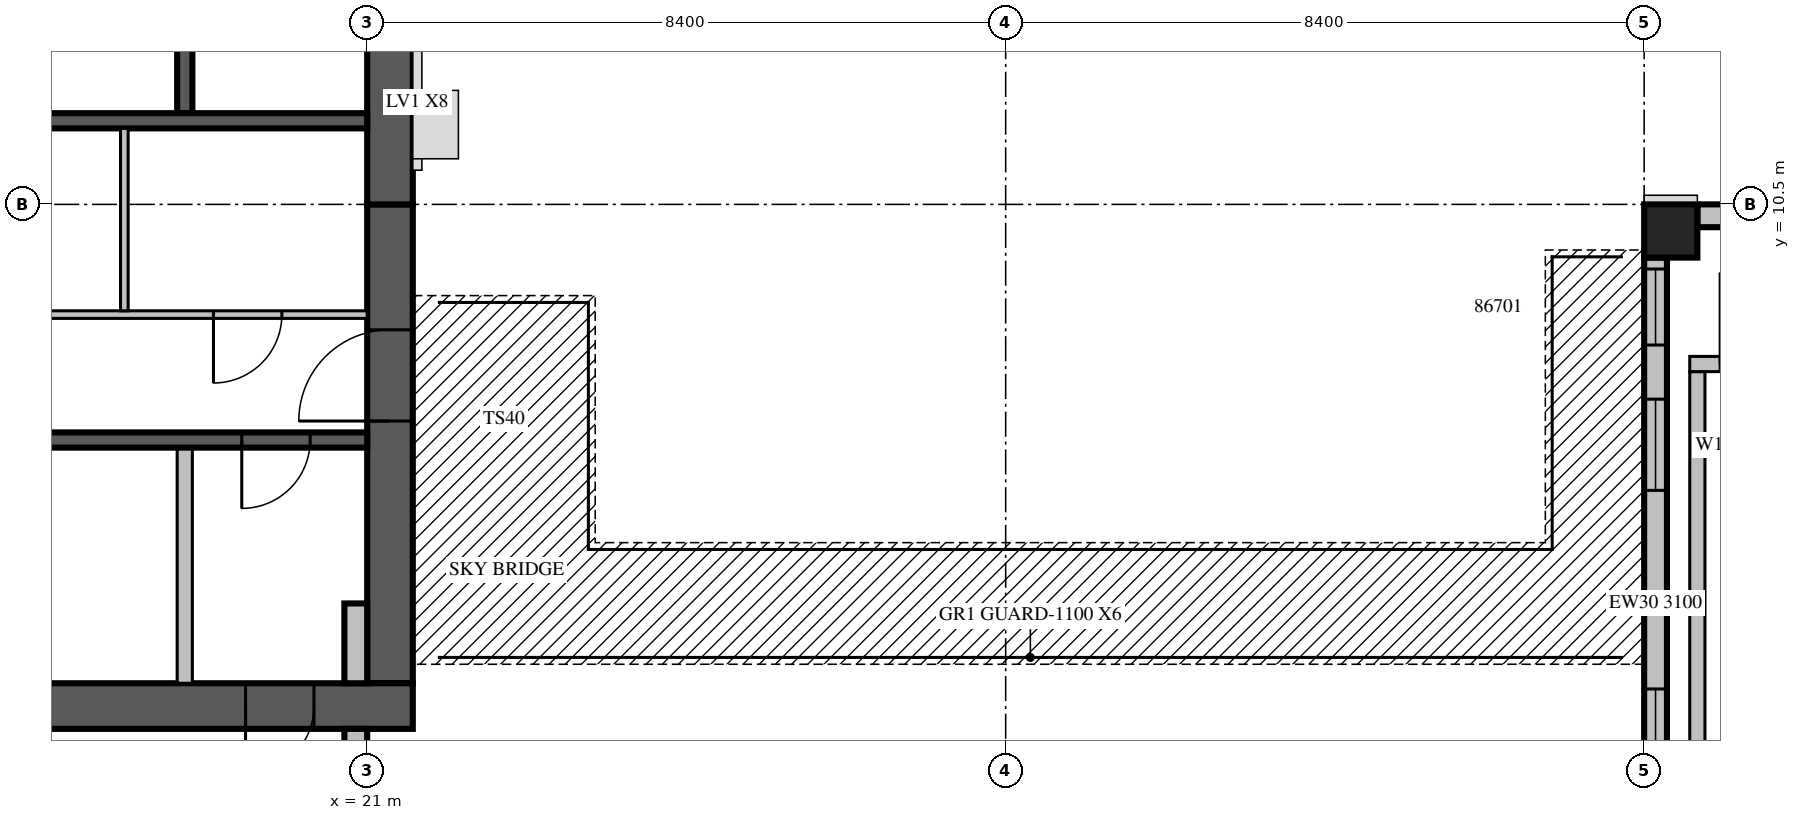
"""IFC4 building model, lengths in metres.
Left out: names, types, materials, properties, quantities, classifications, styles, units other than length and angle.
Written with IfcOpenShell. Run it as: python <this file> out.ifc"""

import sys

from ifc_helpers import new_model, si_unit, direction, frame, frame_2d, origin, origin_2d, place, context, subcontext, project, spatial, rectangle, extrude, source, transform, mapped, element, fill, save


model = new_model("IFC4")
c1 = context("Model", 3, precision=1e-05, world=origin(), true_north=direction((0.0, 1.0)))
c2 = subcontext(c1, "Body", "Model", "MODEL_VIEW")
j1 = project(units=[si_unit("LENGTHUNIT", "METRE"), si_unit("PLANEANGLEUNIT", "RADIAN")], contexts=[c1])
p1 = place(None, origin())
s1 = spatial("IfcSite", under=j1, at=p1, CompositionType="ELEMENT")
p2 = place(p1, origin())
s2 = spatial("IfcBuilding", under=s1, at=p2, CompositionType="ELEMENT")
p3 = place(p2, frame((0.0, 0.0, 295.0)))
s3 = spatial("IfcBuildingStorey", under=s2, at=p3, CompositionType="ELEMENT", Elevation=295.0)
m1 = source(origin(), c2, "Body", "SweptSolid", [
    extrude(rectangle(XDim=0.7, YDim=0.7, at=origin_2d()), origin(), (0.0, 0.0, 1.0), 3.5),
])
p4 = place(p3, frame((38.15, 10.15, 0.0), z_axis=(0.0, 0.0, 1.0), x_axis=(1.0, 0.0, 0.0)))
e1 = element("IfcColumn", 1, at=p4, inside=s3, PredefinedType="COLUMN", context=c2, shape_type="MappedRepresentation", body=[
    mapped(m1, transform((0.0, 0.0, 0.0), scale=1.0)),
])
m2 = source(origin(), c2, "Body", "SweptSolid", [
    extrude(rectangle(XDim=6.3, YDim=0.6, at=frame_2d((3.15, 0.0))), origin(), (0.0, 0.0, 1.0), 3.5),
])
p5 = place(p3, frame((21.3, 4.2, 0.0), z_axis=(0.0, 0.0, 1.0), x_axis=(0.0, 1.0, 0.0)))
e2 = element("IfcWall", 2, at=p5, inside=s3, PredefinedType="SHEAR", context=c2, shape_type="MappedRepresentation", body=[
    mapped(m2, transform((0.0, 0.0, 0.0), scale=1.0)),
])
m3 = source(origin(), c2, "Body", "SweptSolid", [
    extrude(rectangle(XDim=1.2, YDim=2.1, at=frame_2d((0.6, 1.05))), frame((0.0, 0.31, 0.0), z_axis=(0.0, -1.0, 0.0), x_axis=(1.0, 0.0, 0.0)), (0.0, 0.0, 1.0), 0.62),
])
p6 = place(p5, frame((3.45, 0.0, 0.0)))
e3 = element("IfcOpeningElement", 3, at=p6, cuts=e2, PredefinedType="OPENING", context=c2, shape_type="MappedRepresentation", body=[
    mapped(m3, transform((0.0, 0.0, 0.0), scale=1.0)),
])
m4 = source(origin(), c2, "Body", "SweptSolid", [
    extrude(rectangle(XDim=17.4, YDim=0.6, at=frame_2d((8.7, 0.0))), origin(), (0.0, 0.0, 1.0), 3.5),
])
p7 = place(p3, frame((4.2, 3.9, 0.0), z_axis=(0.0, 0.0, 1.0), x_axis=(1.0, 0.0, 0.0)))
e4 = element("IfcWall", 4, at=p7, inside=s3, PredefinedType="SHEAR", context=c2, shape_type="MappedRepresentation", body=[
    mapped(m4, transform((0.0, 0.0, 0.0), scale=1.0)),
])
m5 = source(origin(), c2, "Body", "SweptSolid", [
    extrude(rectangle(XDim=0.9, YDim=2.1, at=frame_2d((0.45, 1.05))), frame((0.0, 0.31, 0.0), z_axis=(0.0, -1.0, 0.0), x_axis=(1.0, 0.0, 0.0)), (0.0, 0.0, 1.0), 0.62),
])
p8 = place(p7, frame((15.2, 0.0, 0.0)))
e5 = element("IfcOpeningElement", 5, at=p8, cuts=e4, PredefinedType="OPENING", context=c2, shape_type="MappedRepresentation", body=[
    mapped(m5, transform((0.0, 0.0, 0.0), scale=1.0)),
])
m6 = source(origin(), c2, "Body", "SweptSolid", [
    extrude(rectangle(XDim=10.5, YDim=0.6, at=frame_2d((5.25, 0.0))), origin(), (0.0, 0.0, 1.0), 3.5),
])
p9 = place(p3, frame((21.3, 10.5, 0.0), z_axis=(0.0, 0.0, 1.0), x_axis=(0.0, 1.0, 0.0)))
e6 = element("IfcWall", 6, at=p9, inside=s3, PredefinedType="SHEAR", context=c2, shape_type="MappedRepresentation", body=[
    mapped(m6, transform((0.0, 0.0, 0.0), scale=1.0)),
])
m7 = source(origin(), c2, "Body", "SweptSolid", [
    extrude(rectangle(XDim=1.2, YDim=2.4, at=frame_2d((0.6, 1.2))), frame((0.0, 0.31, 0.0), z_axis=(0.0, -1.0, 0.0), x_axis=(1.0, 0.0, 0.0)), (0.0, 0.0, 1.0), 0.62),
])
p10 = place(p9, frame((5.7, 0.0, 0.6)))
e7 = element("IfcOpeningElement", 7, at=p10, cuts=e6, PredefinedType="OPENING", context=c2, shape_type="MappedRepresentation", body=[
    mapped(m7, transform((0.0, 0.0, 0.0), scale=1.0)),
])
m8 = source(origin(), c2, "Body", "SweptSolid", [
    extrude(rectangle(XDim=2.9, YDim=0.3, at=frame_2d((1.45, 0.0))), origin(), (0.0, 0.0, 1.0), 3.1),
])
p11 = place(p3, frame((20.85, 0.7, 0.0), z_axis=(0.0, 0.0, 1.0), x_axis=(0.0, 1.0, 0.0)))
e8 = element("IfcWall", 8, at=p11, inside=s3, PredefinedType="STANDARD", context=c2, shape_type="MappedRepresentation", body=[
    mapped(m8, transform((0.0, 0.0, 0.0), scale=1.0)),
])
m9 = source(origin(), c2, "Body", "SweptSolid", [
    extrude(rectangle(XDim=1.2, YDim=2.0, at=frame_2d((0.6, 1.0))), frame((0.0, 0.16, 0.0), z_axis=(0.0, -1.0, 0.0), x_axis=(1.0, 0.0, 0.0)), (0.0, 0.0, 1.0), 0.32),
])
p12 = place(p11, frame((1.325, 0.0, 0.6)))
e9 = element("IfcOpeningElement", 9, at=p12, cuts=e8, PredefinedType="OPENING", context=c2, shape_type="MappedRepresentation", body=[
    mapped(m9, transform((0.0, 0.0, 0.0), scale=1.0)),
])
m10 = source(origin(), c2, "Body", "SweptSolid", [
    extrude(rectangle(XDim=1.05, YDim=0.3, at=frame_2d((0.525, 0.0))), origin(), (0.0, 0.0, 1.0), 3.1),
])
p13 = place(p3, frame((20.85, 4.2, 0.0), z_axis=(0.0, 0.0, 1.0), x_axis=(0.0, 1.0, 0.0)))
e10 = element("IfcWall", 10, at=p13, inside=s3, PredefinedType="STANDARD", context=c2, shape_type="MappedRepresentation", body=[
    mapped(m10, transform((0.0, 0.0, 0.0), scale=1.0)),
])
m11 = source(origin(), c2, "Body", "SweptSolid", [
    extrude(rectangle(XDim=7.35, YDim=0.3, at=frame_2d((3.675, 0.0))), origin(), (0.0, 0.0, 1.0), 3.1),
])
p14 = place(p3, frame((45.85, 10.35, 0.0), z_axis=(0.0, 0.0, 1.0), x_axis=(-1.0, 0.0, 0.0)))
e11 = element("IfcWall", 11, at=p14, inside=s3, PredefinedType="STANDARD", context=c2, shape_type="MappedRepresentation", body=[
    mapped(m11, transform((0.0, 0.0, 0.0), scale=1.0)),
])
m12 = source(origin(), c2, "Body", "SweptSolid", [
    extrude(rectangle(XDim=3.0, YDim=2.0, at=frame_2d((1.5, 1.0))), frame((0.0, 0.16, 0.0), z_axis=(0.0, -1.0, 0.0), x_axis=(1.0, 0.0, 0.0)), (0.0, 0.0, 1.0), 0.32),
])
p15 = place(p14, frame((1.09, 0.0, 0.6)))
e12 = element("IfcOpeningElement", 12, at=p15, cuts=e11, PredefinedType="OPENING", context=c2, shape_type="MappedRepresentation", body=[
    mapped(m12, transform((0.0, 0.0, 0.0), scale=1.0)),
])
p16 = place(p14, frame((5.77, 0.0, 0.6)))
e13 = element("IfcOpeningElement", 13, at=p16, cuts=e11, PredefinedType="OPENING", context=c2, shape_type="MappedRepresentation", body=[
    mapped(m9, transform((0.0, 0.0, 0.0), scale=1.0)),
])
p17 = place(p3, frame((37.95, 9.8, 0.0), z_axis=(0.0, 0.0, 1.0), x_axis=(0.0, -1.0, 0.0)))
e14 = element("IfcWall", 14, at=p17, inside=s3, PredefinedType="STANDARD", context=c2, shape_type="SweptSolid", body=[
    extrude(rectangle(XDim=9.1, YDim=0.3, at=frame_2d((4.55, 0.0))), origin(), (0.0, 0.0, 1.0), 3.1),
])
p18 = place(p17, frame((1.863, 0.0, 0.6)))
e15 = element("IfcOpeningElement", 15, at=p18, cuts=e14, PredefinedType="OPENING", context=c2, shape_type="MappedRepresentation", body=[
    mapped(m9, transform((0.0, 0.0, 0.0), scale=1.0)),
])
p19 = place(p17, frame((5.675, 0.0, 0.6)))
e16 = element("IfcOpeningElement", 16, at=p19, cuts=e14, PredefinedType="OPENING", context=c2, shape_type="MappedRepresentation", body=[
    mapped(m12, transform((0.0, 0.0, 0.0), scale=1.0)),
])
p20 = place(p17, frame((0.15, 0.0, 0.0)))
e17 = element("IfcOpeningElement", 17, at=p20, cuts=e14, PredefinedType="OPENING", context=c2, shape_type="SweptSolid", body=[
    extrude(rectangle(XDim=1.0, YDim=2.1, at=frame_2d((0.5, 1.05))), frame((0.0, 0.16, 0.0), z_axis=(0.0, -1.0, 0.0), x_axis=(1.0, 0.0, 0.0)), (0.0, 0.0, 1.0), 0.32),
])
m13 = source(origin(), c2, "Body", "SweptSolid", [
    extrude(rectangle(XDim=3.1, YDim=0.2, at=frame_2d((1.55, 0.0))), origin(), (0.0, 0.0, 1.0), 3.1),
])
p21 = place(p3, frame((18.6, 4.2, 0.0), z_axis=(0.0, 0.0, 1.0), x_axis=(0.0, 1.0, 0.0)))
e18 = element("IfcWall", 18, at=p21, inside=s3, PredefinedType="PARTITIONING", context=c2, shape_type="MappedRepresentation", body=[
    mapped(m13, transform((0.0, 0.0, 0.0), scale=1.0)),
])
m14 = source(origin(), c2, "Body", "SweptSolid", [
    extrude(rectangle(XDim=3.0, YDim=0.2, at=frame_2d((1.5, 0.0))), origin(), (0.0, 0.0, 1.0), 3.5),
])
p22 = place(p3, frame((18.6, 11.7, 0.0), z_axis=(0.0, 0.0, 1.0), x_axis=(0.0, 1.0, 0.0)))
e19 = element("IfcWall", 19, at=p22, inside=s3, PredefinedType="SOLIDWALL", context=c2, shape_type="MappedRepresentation", body=[
    mapped(m14, transform((0.0, 0.0, 0.0), scale=1.0)),
])
m15 = source(origin(), c2, "Body", "SweptSolid", [
    extrude(rectangle(XDim=7.2, YDim=0.2, at=frame_2d((3.6, 0.0))), origin(), (0.0, 0.0, 1.0), 3.1),
])
p23 = place(p3, frame((13.8, 7.4, 0.0), z_axis=(0.0, 0.0, 1.0), x_axis=(1.0, 0.0, 0.0)))
e20 = element("IfcWall", 20, at=p23, inside=s3, PredefinedType="SOLIDWALL", context=c2, shape_type="MappedRepresentation", body=[
    mapped(m15, transform((0.0, 0.0, 0.0), scale=1.0)),
])
m16 = source(origin(), c2, "Body", "SweptSolid", [
    extrude(rectangle(XDim=0.9, YDim=2.1, at=frame_2d((0.45, 1.05))), frame((0.0, 0.11, 0.0), z_axis=(0.0, -1.0, 0.0), x_axis=(1.0, 0.0, 0.0)), (0.0, 0.0, 1.0), 0.22),
])
p24 = place(p23, frame((1.95, 0.0, 0.0)))
e21 = element("IfcOpeningElement", 21, at=p24, cuts=e20, PredefinedType="OPENING", context=c2, shape_type="MappedRepresentation", body=[
    mapped(m16, transform((0.0, 0.0, 0.0), scale=1.0)),
])
p25 = place(p23, frame((5.55, 0.0, 0.0)))
e22 = element("IfcOpeningElement", 22, at=p25, cuts=e20, PredefinedType="OPENING", context=c2, shape_type="MappedRepresentation", body=[
    mapped(m16, transform((0.0, 0.0, 0.0), scale=1.0)),
])
m17 = source(origin(), c2, "Body", "SweptSolid", [
    extrude(rectangle(XDim=7.2, YDim=0.2, at=frame_2d((3.6, 0.0))), origin(), (0.0, 0.0, 1.0), 3.5),
])
p26 = place(p3, frame((13.8, 11.6, 0.0), z_axis=(0.0, 0.0, 1.0), x_axis=(1.0, 0.0, 0.0)))
e23 = element("IfcWall", 23, at=p26, inside=s3, PredefinedType="SOLIDWALL", context=c2, shape_type="MappedRepresentation", body=[
    mapped(m17, transform((0.0, 0.0, 0.0), scale=1.0)),
])
p27 = place(p3, frame((13.8, 9.05, 0.0), z_axis=(0.0, 0.0, 1.0), x_axis=(1.0, 0.0, 0.0)))
e24 = element("IfcWall", 24, at=p27, inside=s3, PredefinedType="PARTITIONING", context=c2, shape_type="SweptSolid", body=[
    extrude(rectangle(XDim=7.2, YDim=0.1, at=frame_2d((3.6, 0.0))), origin(), (0.0, 0.0, 1.0), 3.1),
])
m18 = source(origin(), c2, "Body", "SweptSolid", [
    extrude(rectangle(XDim=0.9, YDim=2.1, at=frame_2d((0.45, 1.05))), frame((0.0, 0.06, 0.0), z_axis=(0.0, -1.0, 0.0), x_axis=(1.0, 0.0, 0.0)), (0.0, 0.0, 1.0), 0.12),
])
p28 = place(p27, frame((5.178, 0.0, 0.0)))
e25 = element("IfcOpeningElement", 25, at=p28, cuts=e24, PredefinedType="OPENING", context=c2, shape_type="MappedRepresentation", body=[
    mapped(m18, transform((0.0, 0.0, 0.0), scale=1.0)),
])
m19 = source(origin(), c2, "Body", "SweptSolid", [
    extrude(rectangle(XDim=2.4, YDim=0.1, at=frame_2d((1.2, 0.0))), origin(), (0.0, 0.0, 1.0), 3.1),
])
p29 = place(p3, frame((17.805, 9.1, 0.0), z_axis=(0.0, 0.0, 1.0), x_axis=(0.0, 1.0, 0.0)))
e26 = element("IfcWall", 26, at=p29, inside=s3, PredefinedType="PARTITIONING", context=c2, shape_type="MappedRepresentation", body=[
    mapped(m19, transform((0.0, 0.0, 0.0), scale=1.0)),
])
m20 = source(origin(), c2, "Body", "SweptSolid", [
    extrude(rectangle(XDim=8.0, YDim=0.2, at=frame_2d((4.0, 0.0))), origin(), (0.0, 0.0, 1.0), 3.1),
])
p30 = place(p3, frame((38.5, 0.3, 0.0), z_axis=(0.0, 0.0, 1.0), x_axis=(0.0, 1.0, 0.0)))
e27 = element("IfcWall", 27, at=p30, inside=s3, PredefinedType="PARTITIONING", context=c2, shape_type="MappedRepresentation", body=[
    mapped(m20, transform((0.0, 0.0, 0.0), scale=1.0)),
])
m21 = source(origin(), c2, "Body", "SweptSolid", [
    extrude(rectangle(XDim=5.45, YDim=0.2, at=frame_2d((2.725, 0.0))), origin(), (0.0, 0.0, 1.0), 3.1),
])
p31 = place(p3, frame((38.4, 8.4, 0.0), z_axis=(0.0, 0.0, 1.0), x_axis=(1.0, 0.0, 0.0)))
e28 = element("IfcWall", 28, at=p31, inside=s3, PredefinedType="PARTITIONING", context=c2, shape_type="MappedRepresentation", body=[
    mapped(m21, transform((0.0, 0.0, 0.0), scale=1.0)),
])
m22 = source(origin(), c2, "Body", "SweptSolid", [
    extrude(rectangle(XDim=1.2, YDim=2.1, at=frame_2d((0.6, 1.05))), frame((0.0, 0.11, 0.0), z_axis=(0.0, -1.0, 0.0), x_axis=(1.0, 0.0, 0.0)), (0.0, 0.0, 1.0), 0.22),
])
p32 = place(p31, frame((0.4, 0.0, 0.0)))
e29 = element("IfcOpeningElement", 29, at=p32, cuts=e28, PredefinedType="OPENING", context=c2, shape_type="MappedRepresentation", body=[
    mapped(m22, transform((0.0, 0.0, 0.0), scale=1.0)),
])
p33 = place(p31, frame((3.25, 0.0, 0.0)))
e30 = element("IfcOpeningElement", 30, at=p33, cuts=e28, PredefinedType="OPENING", context=c2, shape_type="MappedRepresentation", body=[
    mapped(m16, transform((0.0, 0.0, 0.0), scale=1.0)),
])
m23 = source(origin(), c2, "Body", "SweptSolid", [
    extrude(rectangle(XDim=1.2, YDim=2.0, at=frame_2d((0.6, 1.0))), frame((0.0, 0.03, 0.0), z_axis=(0.0, -1.0, 0.0), x_axis=(1.0, 0.0, 0.0)), (0.0, 0.0, 1.0), 0.06),
])
p34 = place(p18, origin())
e31 = element("IfcWindow", 31, at=p34, inside=s3, PartitioningType="SINGLE_PANEL", PredefinedType="WINDOW", context=c2, shape_type="MappedRepresentation", body=[
    mapped(m23, transform((0.0, 0.0, 0.0), scale=1.0)),
])
fill(e15, e31)
m24 = source(origin(), c2, "Body", "SweptSolid", [
    extrude(rectangle(XDim=3.0, YDim=2.0, at=frame_2d((1.5, 1.0))), frame((0.0, 0.03, 0.0), z_axis=(0.0, -1.0, 0.0), x_axis=(1.0, 0.0, 0.0)), (0.0, 0.0, 1.0), 0.06),
])
p35 = place(p19, origin())
e32 = element("IfcWindow", 32, at=p35, inside=s3, PartitioningType="SINGLE_PANEL", PredefinedType="WINDOW", context=c2, shape_type="MappedRepresentation", body=[
    mapped(m24, transform((0.0, 0.0, 0.0), scale=1.0)),
])
fill(e16, e32)
p36 = place(p20, origin())
e33 = element("IfcDoor", 33, at=p36, inside=s3, OperationType="SLIDING_TO_LEFT", PredefinedType="DOOR", context=c2, shape_type="SweptSolid", body=[
    extrude(rectangle(XDim=1.0, YDim=2.1, at=frame_2d((0.5, 1.05))), frame((0.0, 0.025, 0.0), z_axis=(0.0, -1.0, 0.0), x_axis=(1.0, 0.0, 0.0)), (0.0, 0.0, 1.0), 0.05),
])
fill(e17, e33)
m25 = source(origin(), c2, "Body", "SweptSolid", [
    extrude(rectangle(XDim=0.9, YDim=2.1, at=frame_2d((0.45, 1.05))), frame((0.0, 0.025, 0.0), z_axis=(0.0, -1.0, 0.0), x_axis=(1.0, 0.0, 0.0)), (0.0, 0.0, 1.0), 0.05),
])
p37 = place(p25, origin())
e34 = element("IfcDoor", 34, at=p37, inside=s3, OperationType="SINGLE_SWING_RIGHT", PredefinedType="DOOR", context=c2, shape_type="MappedRepresentation", body=[
    mapped(m25, transform((0.0, 0.0, 0.0), scale=1.0)),
])
fill(e22, e34)
p38 = place(p28, origin())
e35 = element("IfcDoor", 35, at=p38, inside=s3, OperationType="SINGLE_SWING_RIGHT", PredefinedType="DOOR", context=c2, shape_type="MappedRepresentation", body=[
    mapped(m25, transform((0.0, 0.0, 0.0), scale=1.0)),
])
fill(e25, e35)
m26 = source(origin(), c2, "Body", "SweptSolid", [
    extrude(rectangle(XDim=1.2, YDim=2.1, at=frame_2d((0.6, 1.05))), frame((0.0, 0.025, 0.0), z_axis=(0.0, -1.0, 0.0), x_axis=(1.0, 0.0, 0.0)), (0.0, 0.0, 1.0), 0.05),
])
p39 = place(p6, origin())
e36 = element("IfcDoor", 36, at=p39, inside=s3, OperationType="SINGLE_SWING_LEFT", PredefinedType="DOOR", context=c2, shape_type="MappedRepresentation", body=[
    mapped(m26, transform((0.0, 0.0, 0.0), scale=1.0)),
])
fill(e3, e36)
p40 = place(p8, origin())
e37 = element("IfcDoor", 37, at=p40, inside=s3, OperationType="SINGLE_SWING_RIGHT", PredefinedType="DOOR", context=c2, shape_type="MappedRepresentation", body=[
    mapped(m25, transform((0.0, 0.0, 0.0), scale=1.0)),
])
fill(e5, e37)
save(model, sys.argv[1])
